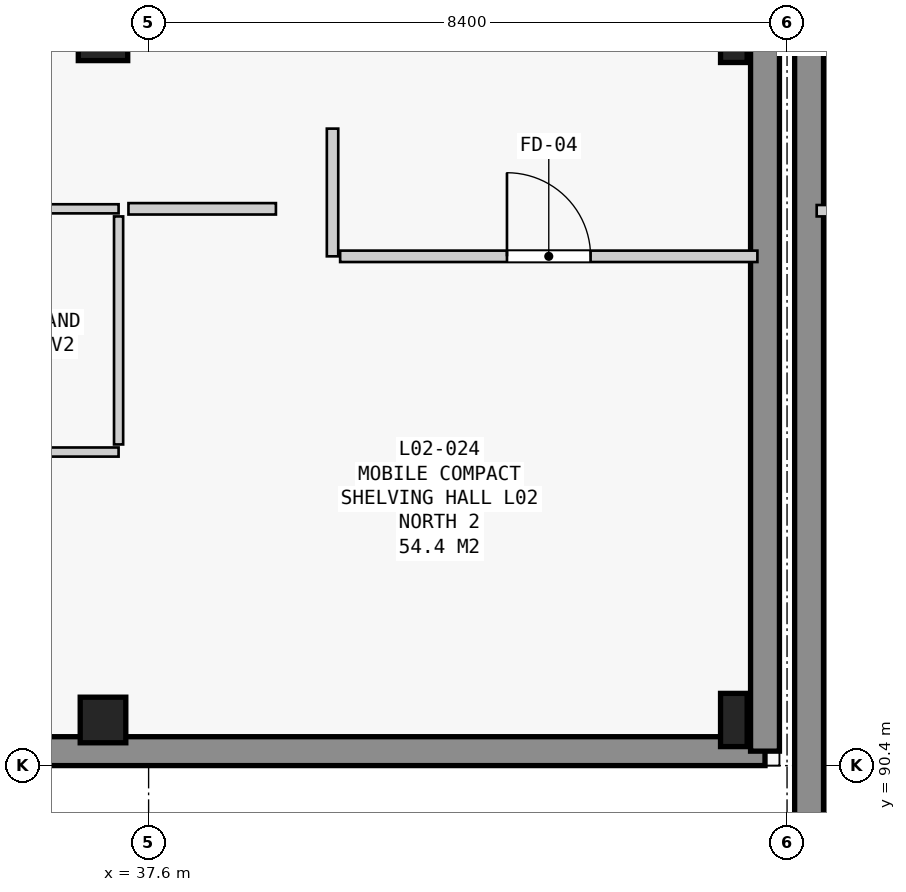
"""IFC4 building model, lengths in metres.
Left out: names, types, materials, properties, quantities, classifications, styles, units other than length and angle.
Written with IfcOpenShell. Run it as: python <this file> out.ifc"""

import sys

from ifc_helpers import new_model, si_unit, direction, frame, frame_2d, origin, origin_2d, place, context, subcontext, project, spatial, rectangle, extrude, element, fill, save


model = new_model("IFC4")
c1 = context("Model", 3, precision=1e-05, world=origin(), true_north=direction((0.0, 1.0)))
c2 = subcontext(c1, "Body", "Model", "MODEL_VIEW")
j1 = project(units=[si_unit("LENGTHUNIT", "METRE"), si_unit("PLANEANGLEUNIT", "RADIAN")], contexts=[c1])
p1 = place(None, origin())
s1 = spatial("IfcSite", under=j1, at=p1, CompositionType="ELEMENT")
p2 = place(p1, origin())
s2 = spatial("IfcBuilding", under=s1, at=p2, CompositionType="ELEMENT")
p3 = place(p2, frame((0.0, 0.0, 9.6)))
s3 = spatial("IfcBuildingStorey", under=s2, at=p3, CompositionType="ELEMENT", Elevation=9.6)
p4 = place(p3, frame((37.0, 91.0, 0.0), z_axis=(0.0, 0.0, 1.0), x_axis=(1.0, 0.0, 0.0)))
e1 = element("IfcColumn", 1, at=p4, inside=s3, PredefinedType="COLUMN", context=c2, shape_type="SweptSolid", body=[
    extrude(rectangle(XDim=0.6, YDim=0.6, at=origin_2d()), origin(), (0.0, 0.0, 1.0), 4.2),
])
p5 = place(p3, frame((37.0, 100.0, 0.0), z_axis=(0.0, 0.0, 1.0), x_axis=(1.0, 0.0, 0.0)))
e2 = element("IfcColumn", 2, at=p5, inside=s3, PredefinedType="COLUMN", context=c2, shape_type="SweptSolid", body=[
    extrude(rectangle(XDim=0.65, YDim=0.65, at=origin_2d()), origin(), (0.0, 0.0, 1.0), 4.2),
])
for number, where, z_axis, x_axis in (
    (3, (45.3, 91.0, 0.0), (0.0, 0.0, 1.0), (1.0, 0.0, 0.0)),
    (4, (45.3, 100.0, 0.0), (0.0, 0.0, 1.0), (1.0, 0.0, 0.0)),
):
    element("IfcColumn", number, at=place(p3, frame(where, z_axis=z_axis, x_axis=x_axis)), inside=s3, PredefinedType="COLUMN", context=c2, shape_type="SweptSolid", body=[
        extrude(rectangle(XDim=0.35, YDim=0.7, at=origin_2d()), origin(), (0.0, 0.0, 1.0), 4.2),
    ])
p6 = place(p3, frame((45.71, 90.59, 0.0), z_axis=(0.0, 0.0, 1.0), x_axis=(-1.0, 0.0, 0.0)))
e5 = element("IfcWall", 5, at=p6, inside=s3, PredefinedType="STANDARD", context=c2, shape_type="SweptSolid", body=[
    extrude(rectangle(XDim=33.12, YDim=0.38, at=frame_2d((16.56, 0.0))), origin(), (0.0, 0.0, 1.0), 3.88),
])
p7 = place(p3, frame((45.71, 117.81, 0.0), z_axis=(0.0, 0.0, 1.0), x_axis=(0.0, -1.0, 0.0)))
e6 = element("IfcWall", 6, at=p7, inside=s3, PredefinedType="STANDARD", context=c2, shape_type="SweptSolid", body=[
    extrude(rectangle(XDim=27.22, YDim=0.38, at=frame_2d((13.61, 0.0))), origin(), (0.0, 0.0, 1.0), 3.88),
])
p8 = place(p7, frame((15.11, 0.0, 0.0)))
e7 = element("IfcOpeningElement", 7, at=p8, cuts=e6, PredefinedType="OPENING", context=c2, shape_type="SweptSolid", body=[
    extrude(rectangle(XDim=1.8, YDim=2.2, at=frame_2d((0.9, 1.1))), frame((0.0, 0.2, 0.0), z_axis=(0.0, -1.0, 0.0), x_axis=(1.0, 0.0, 0.0)), (0.0, 0.0, 1.0), 0.4),
])
p9 = place(p3, frame((46.29, 76.29, 0.0), z_axis=(0.0, 0.0, 1.0), x_axis=(0.0, 1.0, 0.0)))
e8 = element("IfcWall", 8, at=p9, inside=s3, PredefinedType="STANDARD", context=c2, shape_type="SweptSolid", body=[
    extrude(rectangle(XDim=37.52, YDim=0.38, at=frame_2d((18.76, 0.0))), origin(), (0.0, 0.0, 1.0), 3.92),
])
p10 = place(p9, frame((24.61, 0.0, 0.0)))
e9 = element("IfcOpeningElement", 9, at=p10, cuts=e8, PredefinedType="OPENING", context=c2, shape_type="SweptSolid", body=[
    extrude(rectangle(XDim=1.8, YDim=2.2, at=frame_2d((0.9, 1.1))), frame((0.0, 0.2, 0.0), z_axis=(0.0, -1.0, 0.0), x_axis=(1.0, 0.0, 0.0)), (0.0, 0.0, 1.0), 0.4),
])
p11 = place(p3, frame((37.205, 94.525, 0.0), z_axis=(0.0, 0.0, 1.0), x_axis=(-1.0, 0.0, 0.0)))
e10 = element("IfcWall", 10, at=p11, inside=s3, PredefinedType="PARTITIONING", context=c2, shape_type="SweptSolid", body=[
    extrude(rectangle(XDim=3.6, YDim=0.12, at=frame_2d((1.8, 0.0))), origin(), (0.0, 0.0, 1.0), 3.01),
])
p12 = place(p3, frame((33.705, 97.725, 0.0), z_axis=(0.0, 0.0, 1.0), x_axis=(1.0, 0.0, 0.0)))
e11 = element("IfcWall", 11, at=p12, inside=s3, PredefinedType="PARTITIONING", context=c2, shape_type="SweptSolid", body=[
    extrude(rectangle(XDim=3.5, YDim=0.12, at=frame_2d((1.75, 0.0))), origin(), (0.0, 0.0, 1.0), 3.01),
])
p13 = place(p12, frame((1.275, 0.0, 0.0)))
e12 = element("IfcOpeningElement", 12, at=p13, cuts=e11, PredefinedType="OPENING", context=c2, shape_type="SweptSolid", body=[
    extrude(rectangle(XDim=0.95, YDim=2.15, at=frame_2d((0.475, 1.075))), frame((0.0, 0.07, 0.0), z_axis=(0.0, -1.0, 0.0), x_axis=(1.0, 0.0, 0.0)), (0.0, 0.0, 1.0), 0.14),
])
p14 = place(p3, frame((37.205, 97.625, 0.0), z_axis=(0.0, 0.0, 1.0), x_axis=(0.0, -1.0, 0.0)))
e13 = element("IfcWall", 13, at=p14, inside=s3, PredefinedType="PARTITIONING", context=c2, shape_type="SweptSolid", body=[
    extrude(rectangle(XDim=3.0, YDim=0.12, at=frame_2d((1.5, 0.0))), origin(), (0.0, 0.0, 1.0), 3.01),
])
p15 = place(p3, frame((40.02, 98.78, 0.0), z_axis=(0.0, 0.0, 1.0), x_axis=(0.0, -1.0, 0.0)))
e14 = element("IfcWall", 14, at=p15, inside=s3, PredefinedType="PARTITIONING", context=c2, shape_type="SweptSolid", body=[
    extrude(rectangle(XDim=1.68, YDim=0.15, at=frame_2d((0.84, 0.0))), origin(), (0.0, 0.0, 1.0), 3.88),
])
p16 = place(p3, frame((40.12, 97.1, 0.0), z_axis=(0.0, 0.0, 1.0), x_axis=(1.0, 0.0, 0.0)))
e15 = element("IfcWall", 15, at=p16, inside=s3, PredefinedType="PARTITIONING", context=c2, shape_type="SweptSolid", body=[
    extrude(rectangle(XDim=5.49, YDim=0.15, at=frame_2d((2.745, 0.0))), origin(), (0.0, 0.0, 1.0), 3.11),
])
p17 = place(p16, frame((2.195, 0.0, 0.0)))
e16 = element("IfcOpeningElement", 16, at=p17, cuts=e15, PredefinedType="OPENING", context=c2, shape_type="SweptSolid", body=[
    extrude(rectangle(XDim=1.1, YDim=2.15, at=frame_2d((0.55, 1.075))), frame((0.0, 0.085, 0.0), z_axis=(0.0, -1.0, 0.0), x_axis=(1.0, 0.0, 0.0)), (0.0, 0.0, 1.0), 0.17),
])
p18 = place(p3, frame((37.335, 97.725, 0.0), z_axis=(0.0, 0.0, 1.0), x_axis=(1.0, 0.0, 0.0)))
e17 = element("IfcWall", 17, at=p18, inside=s3, PredefinedType="PARTITIONING", context=c2, shape_type="SweptSolid", body=[
    extrude(rectangle(XDim=1.94, YDim=0.15, at=frame_2d((0.97, 0.0))), origin(), (0.0, 0.0, 1.0), 3.88),
])
p19 = place(p3, frame((46.39, 97.7, 0.0), z_axis=(0.0, 0.0, 1.0), x_axis=(1.0, 0.0, 0.0)))
e18 = element("IfcWall", 18, at=p19, inside=s3, PredefinedType="PARTITIONING", context=c2, shape_type="SweptSolid", body=[
    extrude(rectangle(XDim=2.485, YDim=0.15, at=frame_2d((1.243, 0.0))), origin(), (0.0, 0.0, 1.0), 2.715),
])
p20 = place(p17, origin())
e19 = element("IfcDoor", 19, at=p20, inside=s3, OperationType="SINGLE_SWING_LEFT", PredefinedType="DOOR", context=c2, shape_type="SweptSolid", body=[
    extrude(rectangle(XDim=1.1, YDim=2.15, at=frame_2d((0.55, 1.075))), frame((0.0, 0.025, 0.0), z_axis=(0.0, -1.0, 0.0), x_axis=(1.0, 0.0, 0.0)), (0.0, 0.0, 1.0), 0.05),
])
fill(e16, e19)
save(model, sys.argv[1])
